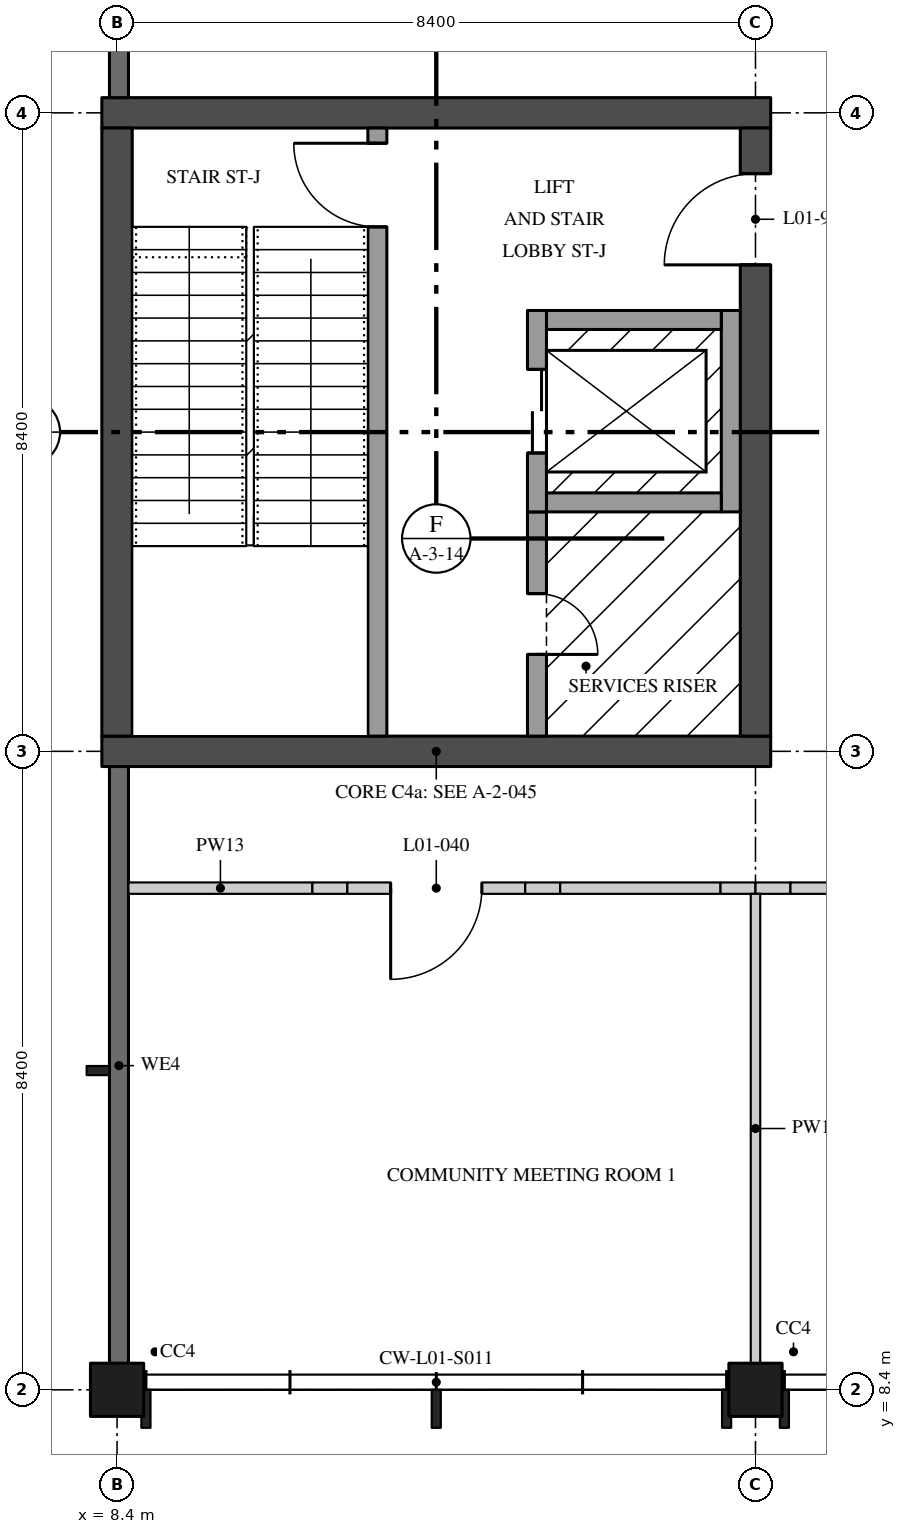
"""IFC4 building model, lengths in metres.
Left out: names, types, materials, properties, quantities, classifications, styles, units other than length and angle.
Written with IfcOpenShell. Run it as: python <this file> out.ifc"""

import sys

from ifc_helpers import new_model, si_unit, direction, frame, frame_2d, origin, origin_2d, place, context, subcontext, project, spatial, rectangle, extrude, element, fill, save


model = new_model("IFC4")
c1 = context("Model", 3, precision=1e-05, world=origin(), true_north=direction((0.0, 1.0)))
c2 = subcontext(c1, "Body", "Model", "MODEL_VIEW")
j1 = project(units=[si_unit("LENGTHUNIT", "METRE"), si_unit("PLANEANGLEUNIT", "RADIAN")], contexts=[c1])
p1 = place(None, origin())
s1 = spatial("IfcSite", under=j1, at=p1, CompositionType="ELEMENT")
p2 = place(p1, origin())
s2 = spatial("IfcBuilding", under=s1, at=p2, CompositionType="ELEMENT")
p3 = place(p2, frame((0.0, 0.0, 5.4)))
s3 = spatial("IfcBuildingStorey", under=s2, at=p3, CompositionType="ELEMENT", Elevation=5.4)
for number, where, z_axis, x_axis in (
    (1, (8.4, 8.4, 0.0), (0.0, 0.0, 1.0), (1.0, 0.0, 0.0)),
    (2, (16.8, 8.4, 0.0), (0.0, 0.0, 1.0), (1.0, 0.0, 0.0)),
):
    element("IfcColumn", number, at=place(p3, frame(where, z_axis=z_axis, x_axis=x_axis)), inside=s3, PredefinedType="COLUMN", context=c2, shape_type="SweptSolid", body=[
        extrude(rectangle(XDim=0.7, YDim=0.7, at=origin_2d()), origin(), (0.0, 0.0, 1.0), 4.37),
    ])
for number, where, z_axis, x_axis in (
    (3, (8.2, 16.8, 0.0), (0.0, 0.0, 1.0), (1.0, 0.0, 0.0)),
    (4, (8.2, 25.2, 0.0), (0.0, 0.0, 1.0), (1.0, 0.0, 0.0)),
):
    element("IfcWall", number, at=place(p3, frame(where, z_axis=z_axis, x_axis=x_axis)), inside=s3, PredefinedType="SHEAR", context=c2, shape_type="SweptSolid", body=[
        extrude(rectangle(XDim=8.8, YDim=0.4, at=frame_2d((4.4, 0.0))), origin(), (0.0, 0.0, 1.0), 4.37),
    ])
p4 = place(p3, frame((8.4, 17.0, 0.0), z_axis=(0.0, 0.0, 1.0), x_axis=(0.0, 1.0, 0.0)))
e5 = element("IfcWall", 5, at=p4, inside=s3, PredefinedType="SHEAR", context=c2, shape_type="SweptSolid", body=[
    extrude(rectangle(XDim=8.0, YDim=0.4, at=frame_2d((4.0, 0.0))), origin(), (0.0, 0.0, 1.0), 4.37),
])
p5 = place(p3, frame((16.8, 17.0, 0.0), z_axis=(0.0, 0.0, 1.0), x_axis=(0.0, 1.0, 0.0)))
e6 = element("IfcWall", 6, at=p5, inside=s3, PredefinedType="SHEAR", context=c2, shape_type="SweptSolid", body=[
    extrude(rectangle(XDim=8.0, YDim=0.4, at=frame_2d((4.0, 0.0))), origin(), (0.0, 0.0, 1.0), 4.37),
])
p6 = place(p5, frame((6.2, 0.0, 0.0)))
e7 = element("IfcOpeningElement", 7, at=p6, cuts=e6, PredefinedType="OPENING", context=c2, shape_type="SweptSolid", body=[
    extrude(rectangle(XDim=1.2, YDim=2.1, at=frame_2d((0.6, 1.05))), frame((0.0, 0.21, 0.0), z_axis=(0.0, -1.0, 0.0), x_axis=(1.0, 0.0, 0.0)), (0.0, 0.0, 1.0), 0.42),
])
p7 = place(p3, frame((11.825, 25.0, 0.0), z_axis=(0.0, 0.0, 1.0), x_axis=(0.0, -1.0, 0.0)))
e8 = element("IfcWall", 8, at=p7, inside=s3, PredefinedType="SOLIDWALL", context=c2, shape_type="SweptSolid", body=[
    extrude(rectangle(XDim=8.0, YDim=0.25, at=frame_2d((4.0, 0.0))), origin(), (0.0, 0.0, 1.0), 4.37),
])
p8 = place(p7, frame((0.2, 0.0, 0.0)))
e9 = element("IfcOpeningElement", 9, at=p8, cuts=e8, PredefinedType="OPENING", context=c2, shape_type="SweptSolid", body=[
    extrude(rectangle(XDim=1.1, YDim=2.1, at=frame_2d((0.55, 1.05))), frame((0.0, 0.135, 0.0), z_axis=(0.0, -1.0, 0.0), x_axis=(1.0, 0.0, 0.0)), (0.0, 0.0, 1.0), 0.27),
])
p9 = place(p3, frame((13.925, 19.95, 0.0), z_axis=(0.0, 0.0, 1.0), x_axis=(0.0, -1.0, 0.0)))
e10 = element("IfcWall", 10, at=p9, inside=s3, PredefinedType="SOLIDWALL", context=c2, shape_type="SweptSolid", body=[
    extrude(rectangle(XDim=2.95, YDim=0.25, at=frame_2d((1.475, 0.0))), origin(), (0.0, 0.0, 1.0), 4.37),
])
p10 = place(p9, frame((1.075, 0.0, 0.0)))
e11 = element("IfcOpeningElement", 11, at=p10, cuts=e10, PredefinedType="OPENING", context=c2, shape_type="SweptSolid", body=[
    extrude(rectangle(XDim=0.8, YDim=2.1, at=frame_2d((0.4, 1.05))), frame((0.0, 0.135, 0.0), z_axis=(0.0, -1.0, 0.0), x_axis=(1.0, 0.0, 0.0)), (0.0, 0.0, 1.0), 0.27),
])
p11 = place(p3, frame((16.475, 19.95, 0.0), z_axis=(0.0, 0.0, 1.0), x_axis=(0.0, 1.0, 0.0)))
e12 = element("IfcWall", 12, at=p11, inside=s3, PredefinedType="SOLIDWALL", context=c2, shape_type="SweptSolid", body=[
    extrude(rectangle(XDim=2.65, YDim=0.25, at=frame_2d((1.325, 0.0))), origin(), (0.0, 0.0, 1.0), 4.37),
])
for number, where, z_axis, x_axis in (
    (13, (14.05, 22.475, 0.0), (0.0, 0.0, 1.0), (1.0, 0.0, 0.0)),
    (14, (14.05, 20.075, 0.0), (0.0, 0.0, 1.0), (1.0, 0.0, 0.0)),
):
    element("IfcWall", number, at=place(p3, frame(where, z_axis=z_axis, x_axis=x_axis)), inside=s3, PredefinedType="SOLIDWALL", context=c2, shape_type="SweptSolid", body=[
        extrude(rectangle(XDim=2.3, YDim=0.25, at=frame_2d((1.15, 0.0))), origin(), (0.0, 0.0, 1.0), 4.37),
    ])
p12 = place(p3, frame((13.925, 19.95, 0.0), z_axis=(0.0, 0.0, 1.0), x_axis=(0.0, 1.0, 0.0)))
e15 = element("IfcWall", 15, at=p12, inside=s3, PredefinedType="SOLIDWALL", context=c2, shape_type="SweptSolid", body=[
    extrude(rectangle(XDim=2.65, YDim=0.25, at=frame_2d((1.325, 0.0))), origin(), (0.0, 0.0, 1.0), 4.37),
])
p13 = place(p12, frame((0.775, 0.0, 0.0)))
e16 = element("IfcOpeningElement", 16, at=p13, cuts=e15, PredefinedType="OPENING", context=c2, shape_type="SweptSolid", body=[
    extrude(rectangle(XDim=1.1, YDim=2.1, at=frame_2d((0.55, 1.05))), frame((0.0, 0.135, 0.0), z_axis=(0.0, -1.0, 0.0), x_axis=(1.0, 0.0, 0.0)), (0.0, 0.0, 1.0), 0.27),
])
p14 = place(p3, frame((8.55, 15.0, 0.0), z_axis=(0.0, 0.0, 1.0), x_axis=(1.0, 0.0, 0.0)))
e17 = element("IfcWall", 17, at=p14, inside=s3, PredefinedType="PARTITIONING", context=c2, shape_type="SweptSolid", body=[
    extrude(rectangle(XDim=2.42, YDim=0.15, at=frame_2d((1.21, 0.0))), origin(), (0.0, 0.0, 1.0), 4.37),
])
p15 = place(p3, frame((10.97, 15.0, 0.0), z_axis=(0.0, 0.0, 1.0), x_axis=(1.0, 0.0, 0.0)))
e18 = element("IfcWall", 18, at=p15, inside=s3, PredefinedType="PARTITIONING", context=c2, shape_type="SweptSolid", body=[
    extrude(rectangle(XDim=0.46, YDim=0.15, at=frame_2d((0.23, 0.0))), origin(), (0.0, 0.0, 1.0), 3.895),
])
p16 = place(p3, frame((11.43, 15.0, 0.0), z_axis=(0.0, 0.0, 1.0), x_axis=(1.0, 0.0, 0.0)))
e19 = element("IfcWall", 19, at=p16, inside=s3, PredefinedType="PARTITIONING", context=c2, shape_type="SweptSolid", body=[
    extrude(rectangle(XDim=2.34, YDim=0.15, at=frame_2d((1.17, 0.0))), origin(), (0.0, 0.0, 1.0), 4.37),
])
p17 = place(p16, frame((0.57, 0.0, 0.0)))
e20 = element("IfcOpeningElement", 20, at=p17, cuts=e19, PredefinedType="OPENING", context=c2, shape_type="SweptSolid", body=[
    extrude(rectangle(XDim=1.2, YDim=2.4, at=frame_2d((0.6, 1.2))), frame((0.0, 0.085, 0.0), z_axis=(0.0, -1.0, 0.0), x_axis=(1.0, 0.0, 0.0)), (0.0, 0.0, 1.0), 0.17),
])
p18 = place(p3, frame((13.77, 15.0, 0.0), z_axis=(0.0, 0.0, 1.0), x_axis=(1.0, 0.0, 0.0)))
e21 = element("IfcWall", 21, at=p18, inside=s3, PredefinedType="PARTITIONING", context=c2, shape_type="SweptSolid", body=[
    extrude(rectangle(XDim=0.46, YDim=0.15, at=frame_2d((0.23, 0.0))), origin(), (0.0, 0.0, 1.0), 3.895),
])
p19 = place(p3, frame((14.23, 15.0, 0.0), z_axis=(0.0, 0.0, 1.0), x_axis=(1.0, 0.0, 0.0)))
e22 = element("IfcWall", 22, at=p19, inside=s3, PredefinedType="PARTITIONING", context=c2, shape_type="SweptSolid", body=[
    extrude(rectangle(XDim=2.11, YDim=0.15, at=frame_2d((1.055, 0.0))), origin(), (0.0, 0.0, 1.0), 4.37),
])
for number, where, z_axis, x_axis in (
    (23, (16.34, 15.0, 0.0), (0.0, 0.0, 1.0), (1.0, 0.0, 0.0)),
    (24, (16.8, 15.0, 0.0), (0.0, 0.0, 1.0), (1.0, 0.0, 0.0)),
):
    element("IfcWall", number, at=place(p3, frame(where, z_axis=z_axis, x_axis=x_axis)), inside=s3, PredefinedType="PARTITIONING", context=c2, shape_type="SweptSolid", body=[
        extrude(rectangle(XDim=0.46, YDim=0.15, at=frame_2d((0.23, 0.0))), origin(), (0.0, 0.0, 1.0), 3.746),
    ])
p20 = place(p3, frame((17.26, 15.0, 0.0), z_axis=(0.0, 0.0, 1.0), x_axis=(1.0, 0.0, 0.0)))
e25 = element("IfcWall", 25, at=p20, inside=s3, PredefinedType="PARTITIONING", context=c2, shape_type="SweptSolid", body=[
    extrude(rectangle(XDim=2.11, YDim=0.15, at=frame_2d((1.055, 0.0))), origin(), (0.0, 0.0, 1.0), 4.37),
])
p21 = place(p3, frame((16.8, 8.75, 0.0), z_axis=(0.0, 0.0, 1.0), x_axis=(0.0, 1.0, 0.0)))
e26 = element("IfcWall", 26, at=p21, inside=s3, PredefinedType="PARTITIONING", context=c2, shape_type="SweptSolid", body=[
    extrude(rectangle(XDim=6.175, YDim=0.125, at=frame_2d((3.087, 0.0))), origin(), (0.0, 0.0, 1.0), 3.746),
])
p22 = place(p3, frame((8.425, 33.22, 0.0), z_axis=(0.0, 0.0, 1.0), x_axis=(0.0, -1.0, 0.0)))
e27 = element("IfcWall", 27, at=p22, inside=s3, PredefinedType="SOLIDWALL", context=c2, shape_type="SweptSolid", body=[
    extrude(rectangle(XDim=7.82, YDim=0.25, at=frame_2d((3.91, 0.0))), origin(), (0.0, 0.0, 1.0), 3.746),
])
p23 = place(p22, frame((0.82, 0.0, 0.9)))
e28 = element("IfcOpeningElement", 28, at=p23, cuts=e27, PredefinedType="OPENING", context=c2, shape_type="SweptSolid", body=[
    extrude(rectangle(XDim=1.8, YDim=2.1, at=frame_2d((0.9, 1.05))), frame((0.0, 0.135, 0.0), z_axis=(0.0, -1.0, 0.0), x_axis=(1.0, 0.0, 0.0)), (0.0, 0.0, 1.0), 0.27),
])
p24 = place(p3, frame((8.425, 16.6, 0.0), z_axis=(0.0, 0.0, 1.0), x_axis=(0.0, -1.0, 0.0)))
e29 = element("IfcWall", 29, at=p24, inside=s3, PredefinedType="SOLIDWALL", context=c2, shape_type="SweptSolid", body=[
    extrude(rectangle(XDim=7.87, YDim=0.25, at=frame_2d((3.935, 0.0))), origin(), (0.0, 0.0, 1.0), 3.746),
])
p25 = place(p6, origin())
e30 = element("IfcDoor", 30, at=p25, inside=s3, OperationType="SINGLE_SWING_RIGHT", PredefinedType="DOOR", context=c2, shape_type="SweptSolid", body=[
    extrude(rectangle(XDim=1.2, YDim=2.1, at=frame_2d((0.6, 1.05))), frame((0.0, 0.035, 0.0), z_axis=(0.0, -1.0, 0.0), x_axis=(1.0, 0.0, 0.0)), (0.0, 0.0, 1.0), 0.07),
])
fill(e7, e30)
p26 = place(p10, origin())
e31 = element("IfcDoor", 31, at=p26, inside=s3, OperationType="SINGLE_SWING_LEFT", PredefinedType="DOOR", context=c2, shape_type="SweptSolid", body=[
    extrude(rectangle(XDim=0.8, YDim=2.1, at=frame_2d((0.4, 1.05))), frame((0.0, 0.035, 0.0), z_axis=(0.0, -1.0, 0.0), x_axis=(1.0, 0.0, 0.0)), (0.0, 0.0, 1.0), 0.07),
])
fill(e11, e31)
p27 = place(p8, frame((1.1, 0.0, 0.0), z_axis=(0.0, 0.0, 1.0), x_axis=(-1.0, 0.0, 0.0)))
e32 = element("IfcDoor", 32, at=p27, inside=s3, OperationType="SINGLE_SWING_LEFT", PredefinedType="DOOR", context=c2, shape_type="SweptSolid", body=[
    extrude(rectangle(XDim=1.1, YDim=2.1, at=frame_2d((0.55, 1.05))), frame((0.0, 0.035, 0.0), z_axis=(0.0, -1.0, 0.0), x_axis=(1.0, 0.0, 0.0)), (0.0, 0.0, 1.0), 0.07),
])
fill(e9, e32)
p28 = place(p13, origin())
e33 = element("IfcDoor", 33, at=p28, inside=s3, OperationType="DOUBLE_DOOR_SLIDING", PredefinedType="DOOR", context=c2, shape_type="SweptSolid", body=[
    extrude(rectangle(XDim=1.1, YDim=2.1, at=frame_2d((0.55, 1.05))), frame((0.0, 0.04, 0.0), z_axis=(0.0, -1.0, 0.0), x_axis=(1.0, 0.0, 0.0)), (0.0, 0.0, 1.0), 0.08),
])
fill(e16, e33)
p29 = place(p17, frame((1.2, 0.0, 0.0), z_axis=(0.0, 0.0, 1.0), x_axis=(-1.0, 0.0, 0.0)))
e34 = element("IfcDoor", 34, at=p29, inside=s3, OperationType="SINGLE_SWING_LEFT", PredefinedType="DOOR", context=c2, shape_type="SweptSolid", body=[
    extrude(rectangle(XDim=1.2, YDim=2.4, at=frame_2d((0.6, 1.2))), frame((0.0, 0.025, 0.0), z_axis=(0.0, -1.0, 0.0), x_axis=(1.0, 0.0, 0.0)), (0.0, 0.0, 1.0), 0.05),
])
fill(e20, e34)
save(model, sys.argv[1])
